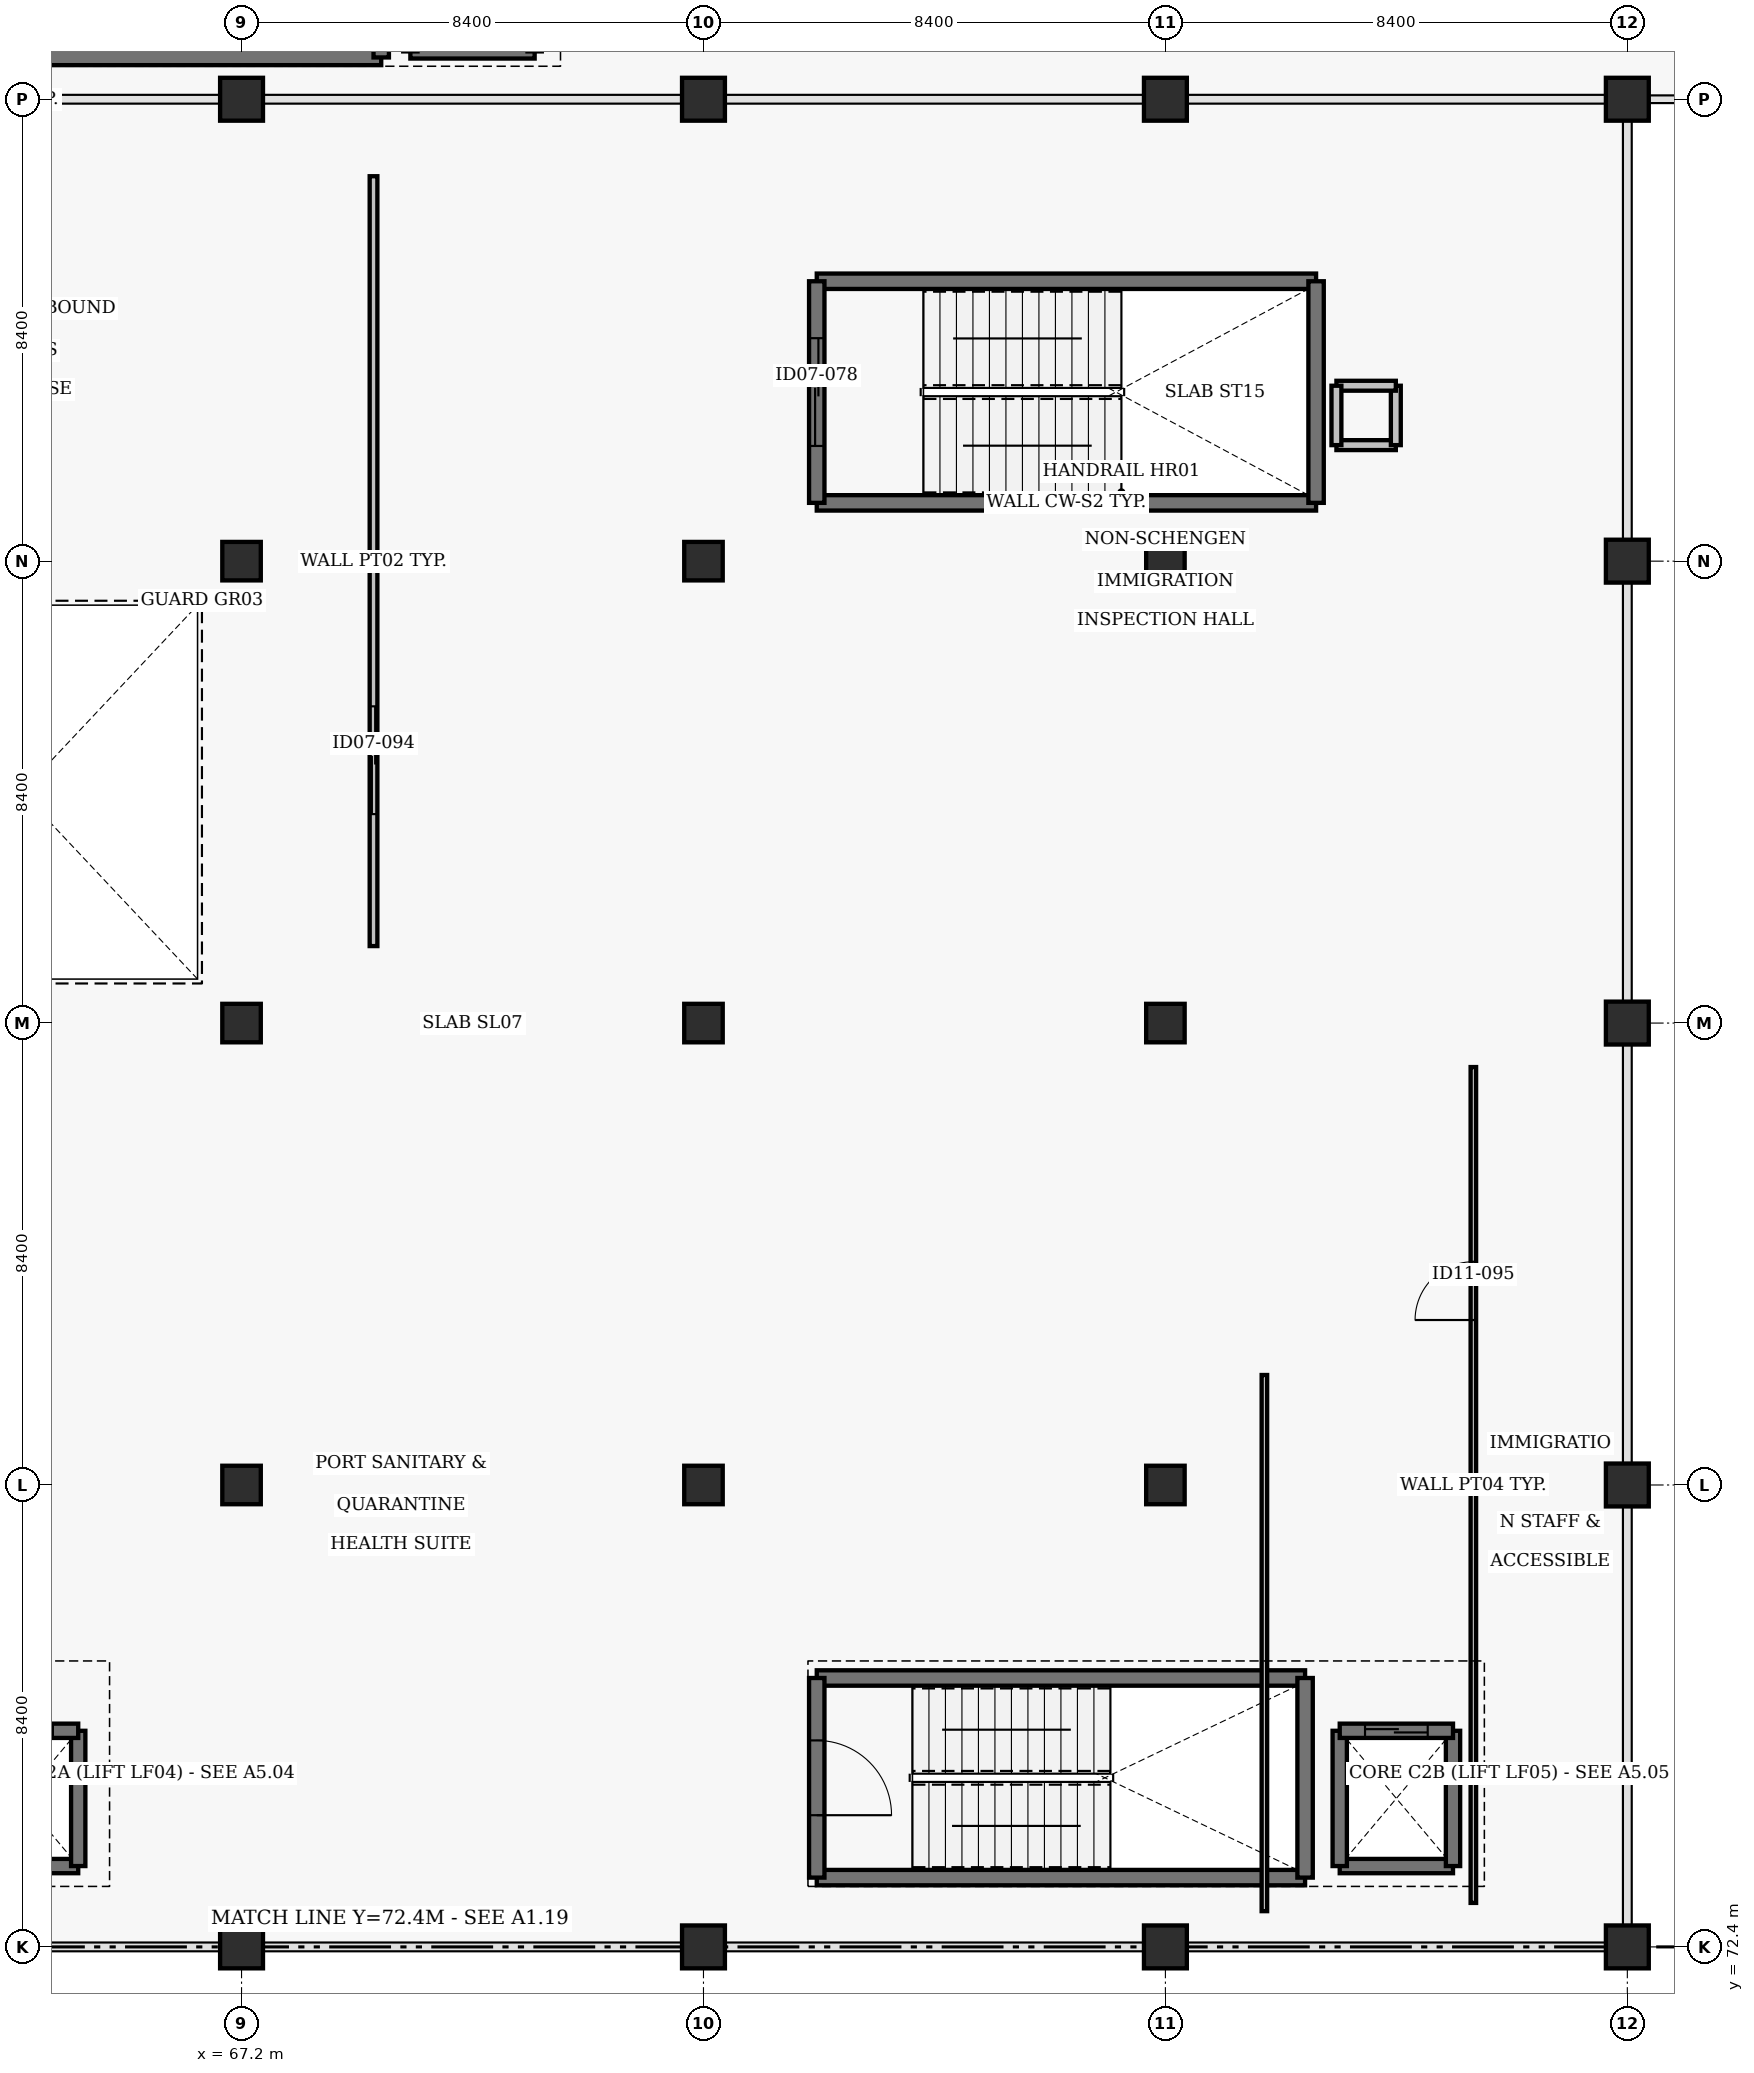
"""IFC4 building model, lengths in metres.
Left out: names, types, materials, properties, quantities, classifications, styles, units other than length and angle.
Written with IfcOpenShell. Run it as: python <this file> out.ifc"""

import sys

from ifc_helpers import new_model, si_unit, direction, frame, frame_2d, origin, origin_2d, place, context, subcontext, project, spatial, rectangle, circle, extrude, element, fill, save


model = new_model("IFC4")
c1 = context("Model", 3, precision=1e-05, world=origin(), true_north=direction((0.0, 1.0)))
c2 = subcontext(c1, "Body", "Model", "MODEL_VIEW")
j1 = project(units=[si_unit("LENGTHUNIT", "METRE"), si_unit("PLANEANGLEUNIT", "RADIAN")], contexts=[c1])
p1 = place(None, origin())
s1 = spatial("IfcSite", under=j1, at=p1, CompositionType="ELEMENT")
p2 = place(p1, origin())
s2 = spatial("IfcBuilding", under=s1, at=p2, CompositionType="ELEMENT")
p3 = place(p2, frame((0.0, 0.0, 5.44)))
s3 = spatial("IfcBuildingStorey", under=s2, at=p3, CompositionType="ELEMENT", Elevation=5.44)
p4 = place(p3, frame((67.2, 72.4, 0.0), z_axis=(0.0, 0.0, 1.0), x_axis=(1.0, 0.0, 0.0)))
e1 = element("IfcColumn", 1, at=p4, inside=s3, PredefinedType="COLUMN", context=c2, shape_type="SweptSolid", body=[
    extrude(circle(Radius=0.39, at=origin_2d()), origin(), (0.0, 0.0, 1.0), 4.16),
])
for number, where, z_axis, x_axis in (
    (2, (67.2, 80.8, 0.0), (0.0, 0.0, 1.0), (1.0, 0.0, 0.0)),
    (3, (67.2, 89.2, 0.0), (0.0, 0.0, 1.0), (1.0, 0.0, 0.0)),
    (4, (67.2, 97.6, 0.0), (0.0, 0.0, 1.0), (1.0, 0.0, 0.0)),
):
    element("IfcColumn", number, at=place(p3, frame(where, z_axis=z_axis, x_axis=x_axis)), inside=s3, PredefinedType="COLUMN", context=c2, shape_type="SweptSolid", body=[
        extrude(rectangle(XDim=0.7, YDim=0.7, at=origin_2d()), origin(), (0.0, 0.0, 1.0), 4.16),
    ])
for number, where, z_axis, x_axis in (
    (5, (67.2, 106.0, 0.0), (0.0, 0.0, 1.0), (1.0, 0.0, 0.0)),
    (6, (75.6, 72.4, 0.0), (0.0, 0.0, 1.0), (1.0, 0.0, 0.0)),
):
    element("IfcColumn", number, at=place(p3, frame(where, z_axis=z_axis, x_axis=x_axis)), inside=s3, PredefinedType="COLUMN", context=c2, shape_type="SweptSolid", body=[
        extrude(circle(Radius=0.39, at=origin_2d()), origin(), (0.0, 0.0, 1.0), 4.16),
    ])
for number, where, z_axis, x_axis in (
    (7, (75.6, 80.8, 0.0), (0.0, 0.0, 1.0), (1.0, 0.0, 0.0)),
    (8, (75.6, 89.2, 0.0), (0.0, 0.0, 1.0), (1.0, 0.0, 0.0)),
    (9, (75.6, 97.6, 0.0), (0.0, 0.0, 1.0), (1.0, 0.0, 0.0)),
):
    element("IfcColumn", number, at=place(p3, frame(where, z_axis=z_axis, x_axis=x_axis)), inside=s3, PredefinedType="COLUMN", context=c2, shape_type="SweptSolid", body=[
        extrude(rectangle(XDim=0.7, YDim=0.7, at=origin_2d()), origin(), (0.0, 0.0, 1.0), 4.16),
    ])
for number, where, z_axis, x_axis in (
    (10, (75.6, 106.0, 0.0), (0.0, 0.0, 1.0), (1.0, 0.0, 0.0)),
    (11, (84.0, 72.4, 0.0), (0.0, 0.0, 1.0), (1.0, 0.0, 0.0)),
):
    element("IfcColumn", number, at=place(p3, frame(where, z_axis=z_axis, x_axis=x_axis)), inside=s3, PredefinedType="COLUMN", context=c2, shape_type="SweptSolid", body=[
        extrude(circle(Radius=0.39, at=origin_2d()), origin(), (0.0, 0.0, 1.0), 4.16),
    ])
for number, where, z_axis, x_axis in (
    (12, (84.0, 80.8, 0.0), (0.0, 0.0, 1.0), (1.0, 0.0, 0.0)),
    (13, (84.0, 89.2, 0.0), (0.0, 0.0, 1.0), (1.0, 0.0, 0.0)),
    (14, (84.0, 97.6, 0.0), (0.0, 0.0, 1.0), (1.0, 0.0, 0.0)),
):
    element("IfcColumn", number, at=place(p3, frame(where, z_axis=z_axis, x_axis=x_axis)), inside=s3, PredefinedType="COLUMN", context=c2, shape_type="SweptSolid", body=[
        extrude(rectangle(XDim=0.7, YDim=0.7, at=origin_2d()), origin(), (0.0, 0.0, 1.0), 4.16),
    ])
for number, where, z_axis, x_axis in (
    (15, (84.0, 106.0, 0.0), (0.0, 0.0, 1.0), (1.0, 0.0, 0.0)),
    (16, (92.4, 72.4, 0.0), (0.0, 0.0, 1.0), (1.0, 0.0, 0.0)),
    (17, (92.4, 80.8, 0.0), (0.0, 0.0, 1.0), (1.0, 0.0, 0.0)),
    (18, (92.4, 89.2, 0.0), (0.0, 0.0, 1.0), (1.0, 0.0, 0.0)),
    (19, (92.4, 97.6, 0.0), (0.0, 0.0, 1.0), (1.0, 0.0, 0.0)),
    (20, (92.4, 106.0, 0.0), (0.0, 0.0, 1.0), (1.0, 0.0, 0.0)),
):
    element("IfcColumn", number, at=place(p3, frame(where, z_axis=z_axis, x_axis=x_axis)), inside=s3, PredefinedType="COLUMN", context=c2, shape_type="SweptSolid", body=[
        extrude(circle(Radius=0.39, at=origin_2d()), origin(), (0.0, 0.0, 1.0), 4.16),
    ])
p5 = place(p3, frame((62.17, 73.87, 0.0), z_axis=(0.0, 0.0, 1.0), x_axis=(1.0, 0.0, 0.0)))
e21 = element("IfcWall", 21, at=p5, inside=s3, PredefinedType="SHEAR", context=c2, shape_type="SweptSolid", body=[
    extrude(rectangle(XDim=2.06, YDim=0.26, at=frame_2d((1.03, 0.0))), origin(), (0.0, 0.0, 1.0), 4.16),
])
p6 = place(p3, frame((64.23, 73.87, 0.0), z_axis=(0.0, 0.0, 1.0), x_axis=(0.0, 1.0, 0.0)))
e22 = element("IfcWall", 22, at=p6, inside=s3, PredefinedType="SHEAR", context=c2, shape_type="SweptSolid", body=[
    extrude(rectangle(XDim=2.46, YDim=0.26, at=frame_2d((1.23, 0.0))), origin(), (0.0, 0.0, 1.0), 4.16),
])
p7 = place(p3, frame((62.17, 76.33, 0.0), z_axis=(0.0, 0.0, 1.0), x_axis=(1.0, 0.0, 0.0)))
e23 = element("IfcWall", 23, at=p7, inside=s3, PredefinedType="SHEAR", context=c2, shape_type="SweptSolid", body=[
    extrude(rectangle(XDim=2.06, YDim=0.26, at=frame_2d((1.03, 0.0))), origin(), (0.0, 0.0, 1.0), 4.16),
])
p8 = place(p7, frame((0.46, 0.0, 0.0)))
e24 = element("IfcOpeningElement", 24, at=p8, cuts=e23, PredefinedType="OPENING", context=c2, shape_type="SweptSolid", body=[
    extrude(rectangle(XDim=1.14, YDim=2.14, at=frame_2d((0.57, 1.07))), frame((0.0, 0.14, 0.0), z_axis=(0.0, -1.0, 0.0), x_axis=(1.0, 0.0, 0.0)), (0.0, 0.0, 1.0), 0.28),
])
for number, where, z_axis, x_axis in (
    (25, (77.66, 73.66, 0.0), (0.0, 0.0, 1.0), (1.0, 0.0, 0.0)),
    (26, (77.66, 77.29, 0.0), (0.0, 0.0, 1.0), (1.0, 0.0, 0.0)),
):
    element("IfcWall", number, at=place(p3, frame(where, z_axis=z_axis, x_axis=x_axis)), inside=s3, PredefinedType="SHEAR", context=c2, shape_type="SweptSolid", body=[
        extrude(rectangle(XDim=8.88, YDim=0.28, at=frame_2d((4.44, 0.0))), origin(), (0.0, 0.0, 1.0), 4.16),
    ])
p9 = place(p3, frame((77.66, 77.29, 0.0), z_axis=(0.0, 0.0, 1.0), x_axis=(0.0, -1.0, 0.0)))
e27 = element("IfcWall", 27, at=p9, inside=s3, PredefinedType="SHEAR", context=c2, shape_type="SweptSolid", body=[
    extrude(rectangle(XDim=3.63, YDim=0.28, at=frame_2d((1.815, 0.0))), origin(), (0.0, 0.0, 1.0), 4.16),
])
p10 = place(p9, frame((1.135, 0.0, 0.0)))
e28 = element("IfcOpeningElement", 28, at=p10, cuts=e27, PredefinedType="OPENING", context=c2, shape_type="SweptSolid", body=[
    extrude(rectangle(XDim=1.36, YDim=2.15, at=frame_2d((0.68, 1.075))), frame((0.0, 0.15, 0.0), z_axis=(0.0, -1.0, 0.0), x_axis=(1.0, 0.0, 0.0)), (0.0, 0.0, 1.0), 0.3),
])
p11 = place(p3, frame((86.54, 73.66, 0.0), z_axis=(0.0, 0.0, 1.0), x_axis=(0.0, 1.0, 0.0)))
e29 = element("IfcWall", 29, at=p11, inside=s3, PredefinedType="SHEAR", context=c2, shape_type="SweptSolid", body=[
    extrude(rectangle(XDim=3.63, YDim=0.28, at=frame_2d((1.815, 0.0))), origin(), (0.0, 0.0, 1.0), 4.16),
])
p12 = place(p3, frame((87.17, 73.87, 0.0), z_axis=(0.0, 0.0, 1.0), x_axis=(1.0, 0.0, 0.0)))
e30 = element("IfcWall", 30, at=p12, inside=s3, PredefinedType="SHEAR", context=c2, shape_type="SweptSolid", body=[
    extrude(rectangle(XDim=2.06, YDim=0.26, at=frame_2d((1.03, 0.0))), origin(), (0.0, 0.0, 1.0), 4.16),
])
for number, where, z_axis, x_axis in (
    (31, (89.23, 73.87, 0.0), (0.0, 0.0, 1.0), (0.0, 1.0, 0.0)),
    (32, (87.17, 76.33, 0.0), (0.0, 0.0, 1.0), (0.0, -1.0, 0.0)),
):
    element("IfcWall", number, at=place(p3, frame(where, z_axis=z_axis, x_axis=x_axis)), inside=s3, PredefinedType="SHEAR", context=c2, shape_type="SweptSolid", body=[
        extrude(rectangle(XDim=2.46, YDim=0.26, at=frame_2d((1.23, 0.0))), origin(), (0.0, 0.0, 1.0), 4.16),
    ])
p13 = place(p3, frame((87.17, 76.33, 0.0), z_axis=(0.0, 0.0, 1.0), x_axis=(1.0, 0.0, 0.0)))
e33 = element("IfcWall", 33, at=p13, inside=s3, PredefinedType="SHEAR", context=c2, shape_type="SweptSolid", body=[
    extrude(rectangle(XDim=2.06, YDim=0.26, at=frame_2d((1.03, 0.0))), origin(), (0.0, 0.0, 1.0), 4.16),
])
p14 = place(p13, frame((0.46, 0.0, 0.0)))
e34 = element("IfcOpeningElement", 34, at=p14, cuts=e33, PredefinedType="OPENING", context=c2, shape_type="SweptSolid", body=[
    extrude(rectangle(XDim=1.14, YDim=2.14, at=frame_2d((0.57, 1.07))), frame((0.0, 0.14, 0.0), z_axis=(0.0, -1.0, 0.0), x_axis=(1.0, 0.0, 0.0)), (0.0, 0.0, 1.0), 0.28),
])
p15 = place(p3, frame((60.86, 106.76, 0.0), z_axis=(0.0, 0.0, 1.0), x_axis=(1.0, 0.0, 0.0)))
e35 = element("IfcWall", 35, at=p15, inside=s3, PredefinedType="SHEAR", context=c2, shape_type="SweptSolid", body=[
    extrude(rectangle(XDim=8.88, YDim=0.28, at=frame_2d((4.44, 0.0))), origin(), (0.0, 0.0, 1.0), 3.98),
])
p16 = place(p3, frame((69.74, 106.76, 0.0), z_axis=(0.0, 0.0, 1.0), x_axis=(0.0, 1.0, 0.0)))
e36 = element("IfcWall", 36, at=p16, inside=s3, PredefinedType="SHEAR", context=c2, shape_type="SweptSolid", body=[
    extrude(rectangle(XDim=3.43, YDim=0.28, at=frame_2d((1.715, 0.0))), origin(), (0.0, 0.0, 1.0), 3.98),
])
p17 = place(p3, frame((70.27, 106.87, 0.0), z_axis=(0.0, 0.0, 1.0), x_axis=(1.0, 0.0, 0.0)))
e37 = element("IfcWall", 37, at=p17, inside=s3, PredefinedType="SHEAR", context=c2, shape_type="SweptSolid", body=[
    extrude(rectangle(XDim=2.26, YDim=0.26, at=frame_2d((1.13, 0.0))), origin(), (0.0, 0.0, 1.0), 3.98),
])
for number, where, z_axis, x_axis in (
    (38, (77.66, 98.66, 0.0), (0.0, 0.0, 1.0), (1.0, 0.0, 0.0)),
    (39, (77.66, 102.69, 0.0), (0.0, 0.0, 1.0), (1.0, 0.0, 0.0)),
):
    element("IfcWall", number, at=place(p3, frame(where, z_axis=z_axis, x_axis=x_axis)), inside=s3, PredefinedType="SHEAR", context=c2, shape_type="SweptSolid", body=[
        extrude(rectangle(XDim=9.08, YDim=0.28, at=frame_2d((4.54, 0.0))), origin(), (0.0, 0.0, 1.0), 4.16),
    ])
p18 = place(p3, frame((77.66, 102.69, 0.0), z_axis=(0.0, 0.0, 1.0), x_axis=(0.0, -1.0, 0.0)))
e40 = element("IfcWall", 40, at=p18, inside=s3, PredefinedType="SHEAR", context=c2, shape_type="SweptSolid", body=[
    extrude(rectangle(XDim=4.03, YDim=0.28, at=frame_2d((2.015, 0.0))), origin(), (0.0, 0.0, 1.0), 4.16),
])
p19 = place(p18, frame((1.035, 0.0, 0.0)))
e41 = element("IfcOpeningElement", 41, at=p19, cuts=e40, PredefinedType="OPENING", context=c2, shape_type="SweptSolid", body=[
    extrude(rectangle(XDim=1.96, YDim=2.22, at=frame_2d((0.98, 1.11))), frame((0.0, 0.15, 0.0), z_axis=(0.0, -1.0, 0.0), x_axis=(1.0, 0.0, 0.0)), (0.0, 0.0, 1.0), 0.3),
])
p20 = place(p3, frame((86.74, 98.66, 0.0), z_axis=(0.0, 0.0, 1.0), x_axis=(0.0, 1.0, 0.0)))
e42 = element("IfcWall", 42, at=p20, inside=s3, PredefinedType="SHEAR", context=c2, shape_type="SweptSolid", body=[
    extrude(rectangle(XDim=4.03, YDim=0.28, at=frame_2d((2.015, 0.0))), origin(), (0.0, 0.0, 1.0), 4.16),
])
p21 = place(p3, frame((87.11, 99.71, 0.0), z_axis=(0.0, 0.0, 1.0), x_axis=(1.0, 0.0, 0.0)))
e43 = element("IfcWall", 43, at=p21, inside=s3, PredefinedType="SOLIDWALL", context=c2, shape_type="SweptSolid", body=[
    extrude(rectangle(XDim=1.08, YDim=0.18, at=frame_2d((0.54, 0.0))), origin(), (0.0, 0.0, 1.0), 2.6),
])
p22 = place(p3, frame((88.19, 99.71, 0.0), z_axis=(0.0, 0.0, 1.0), x_axis=(0.0, 1.0, 0.0)))
e44 = element("IfcWall", 44, at=p22, inside=s3, PredefinedType="SOLIDWALL", context=c2, shape_type="SweptSolid", body=[
    extrude(rectangle(XDim=1.08, YDim=0.18, at=frame_2d((0.54, 0.0))), origin(), (0.0, 0.0, 1.0), 2.6),
])
p23 = place(p3, frame((88.19, 100.79, 0.0), z_axis=(0.0, 0.0, 1.0), x_axis=(-1.0, 0.0, 0.0)))
e45 = element("IfcWall", 45, at=p23, inside=s3, PredefinedType="SOLIDWALL", context=c2, shape_type="SweptSolid", body=[
    extrude(rectangle(XDim=1.08, YDim=0.18, at=frame_2d((0.54, 0.0))), origin(), (0.0, 0.0, 1.0), 2.6),
])
p24 = place(p3, frame((87.11, 100.79, 0.0), z_axis=(0.0, 0.0, 1.0), x_axis=(0.0, -1.0, 0.0)))
e46 = element("IfcWall", 46, at=p24, inside=s3, PredefinedType="SOLIDWALL", context=c2, shape_type="SweptSolid", body=[
    extrude(rectangle(XDim=1.08, YDim=0.18, at=frame_2d((0.54, 0.0))), origin(), (0.0, 0.0, 1.0), 2.6),
])
p25 = place(p3, frame((69.6, 90.6, 0.0), z_axis=(0.0, 0.0, 1.0), x_axis=(0.0, 1.0, 0.0)))
e47 = element("IfcWall", 47, at=p25, inside=s3, PredefinedType="PARTITIONING", context=c2, shape_type="SweptSolid", body=[
    extrude(rectangle(XDim=14.0, YDim=0.14, at=frame_2d((7.0, 0.0))), origin(), (0.0, 0.0, 1.0), 2.9),
])
p26 = place(p25, frame((2.4, 0.0, 0.0)))
e48 = element("IfcOpeningElement", 48, at=p26, cuts=e47, PredefinedType="OPENING", context=c2, shape_type="SweptSolid", body=[
    extrude(rectangle(XDim=1.96, YDim=2.22, at=frame_2d((0.98, 1.11))), frame((0.0, 0.08, 0.0), z_axis=(0.0, -1.0, 0.0), x_axis=(1.0, 0.0, 0.0)), (0.0, 0.0, 1.0), 0.16),
])
p27 = place(p3, frame((89.6, 73.2, 0.0), z_axis=(0.0, 0.0, 1.0), x_axis=(0.0, 1.0, 0.0)))
e49 = element("IfcWall", 49, at=p27, inside=s3, PredefinedType="PARTITIONING", context=c2, shape_type="SweptSolid", body=[
    extrude(rectangle(XDim=15.2, YDim=0.1, at=frame_2d((7.6, 0.0))), origin(), (0.0, 0.0, 1.0), 2.9),
])
p28 = place(p27, frame((10.6, 0.0, 0.0)))
e50 = element("IfcOpeningElement", 50, at=p28, cuts=e49, PredefinedType="OPENING", context=c2, shape_type="SweptSolid", body=[
    extrude(rectangle(XDim=1.06, YDim=2.1, at=frame_2d((0.53, 1.05))), frame((0.0, 0.06, 0.0), z_axis=(0.0, -1.0, 0.0), x_axis=(1.0, 0.0, 0.0)), (0.0, 0.0, 1.0), 0.12),
])
p29 = place(p3, frame((85.8, 73.05, 0.0), z_axis=(0.0, 0.0, 1.0), x_axis=(0.0, 1.0, 0.0)))
e51 = element("IfcWall", 51, at=p29, inside=s3, PredefinedType="PARTITIONING", context=c2, shape_type="SweptSolid", body=[
    extrude(rectangle(XDim=9.75, YDim=0.1, at=frame_2d((4.875, 0.0))), origin(), (0.0, 0.0, 1.0), 2.65),
])
p30 = place(p8, origin())
e52 = element("IfcDoor", 52, at=p30, inside=s3, OperationType="DOUBLE_DOOR_SLIDING", PredefinedType="DOOR", context=c2, shape_type="SweptSolid", body=[
    extrude(rectangle(XDim=1.14, YDim=2.14, at=frame_2d((0.57, 1.07))), frame((0.0, 0.025, 0.0), z_axis=(0.0, -1.0, 0.0), x_axis=(1.0, 0.0, 0.0)), (0.0, 0.0, 1.0), 0.05),
])
fill(e24, e52)
p31 = place(p10, origin())
e53 = element("IfcDoor", 53, at=p31, inside=s3, OperationType="SINGLE_SWING_RIGHT", PredefinedType="DOOR", context=c2, shape_type="SweptSolid", body=[
    extrude(rectangle(XDim=1.36, YDim=2.15, at=frame_2d((0.68, 1.075))), frame((0.0, 0.025, 0.0), z_axis=(0.0, -1.0, 0.0), x_axis=(1.0, 0.0, 0.0)), (0.0, 0.0, 1.0), 0.05),
])
fill(e28, e53)
p32 = place(p14, origin())
e54 = element("IfcDoor", 54, at=p32, inside=s3, OperationType="DOUBLE_DOOR_SLIDING", PredefinedType="DOOR", context=c2, shape_type="SweptSolid", body=[
    extrude(rectangle(XDim=1.14, YDim=2.14, at=frame_2d((0.57, 1.07))), frame((0.0, 0.025, 0.0), z_axis=(0.0, -1.0, 0.0), x_axis=(1.0, 0.0, 0.0)), (0.0, 0.0, 1.0), 0.05),
])
fill(e34, e54)
p33 = place(p19, origin())
e55 = element("IfcDoor", 55, at=p33, inside=s3, OperationType="DOUBLE_DOOR_SLIDING", PredefinedType="DOOR", context=c2, shape_type="SweptSolid", body=[
    extrude(rectangle(XDim=1.96, YDim=2.22, at=frame_2d((0.98, 1.11))), frame((0.0, 0.025, 0.0), z_axis=(0.0, -1.0, 0.0), x_axis=(1.0, 0.0, 0.0)), (0.0, 0.0, 1.0), 0.05),
])
fill(e41, e55)
p34 = place(p26, origin())
e56 = element("IfcDoor", 56, at=p34, inside=s3, OperationType="DOUBLE_DOOR_SLIDING", PredefinedType="DOOR", context=c2, shape_type="SweptSolid", body=[
    extrude(rectangle(XDim=1.96, YDim=2.22, at=frame_2d((0.98, 1.11))), frame((0.0, 0.025, 0.0), z_axis=(0.0, -1.0, 0.0), x_axis=(1.0, 0.0, 0.0)), (0.0, 0.0, 1.0), 0.05),
])
fill(e48, e56)
p35 = place(p28, origin())
e57 = element("IfcDoor", 57, at=p35, inside=s3, OperationType="SINGLE_SWING_LEFT", PredefinedType="DOOR", context=c2, shape_type="SweptSolid", body=[
    extrude(rectangle(XDim=1.06, YDim=2.1, at=frame_2d((0.53, 1.05))), frame((0.0, 0.025, 0.0), z_axis=(0.0, -1.0, 0.0), x_axis=(1.0, 0.0, 0.0)), (0.0, 0.0, 1.0), 0.05),
])
fill(e50, e57)
save(model, sys.argv[1])
